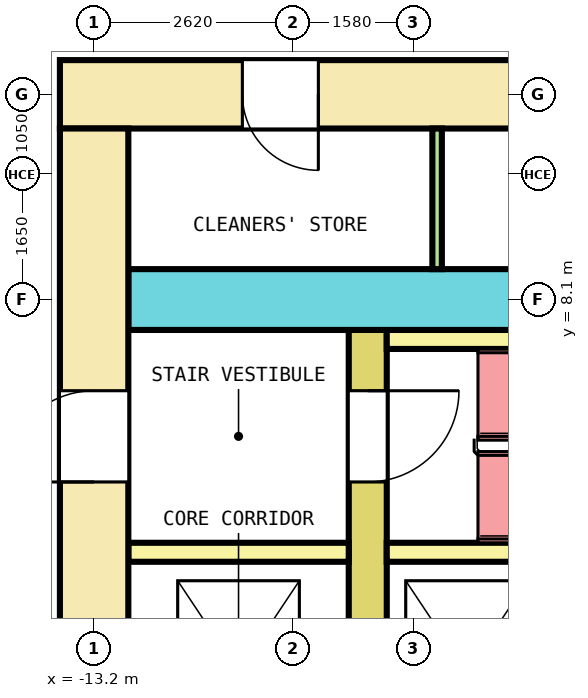
"""IFC4 building model, lengths in metres.
Left out: names, types, materials, properties, quantities, classifications, styles, units other than length and angle.
Written with IfcOpenShell. Run it as: python <this file> out.ifc"""

import sys

from ifc_helpers import new_model, si_unit, direction, frame, frame_2d, origin, place, context, subcontext, project, spatial, rectangle, extrude, element, fill, save


model = new_model("IFC4")
c1 = context("Model", 3, precision=1e-05, world=origin(), true_north=direction((0.0, 1.0)))
c2 = subcontext(c1, "Body", "Model", "MODEL_VIEW")
j1 = project(units=[si_unit("LENGTHUNIT", "METRE"), si_unit("PLANEANGLEUNIT", "RADIAN")], contexts=[c1])
p1 = place(None, origin())
s1 = spatial("IfcSite", under=j1, at=p1, CompositionType="ELEMENT")
p2 = place(p1, origin())
s2 = spatial("IfcBuilding", under=s1, at=p2, CompositionType="ELEMENT")
p3 = place(p2, frame((0.0, 0.0, 27.8)))
s3 = spatial("IfcBuildingStorey", under=s2, at=p3, CompositionType="ELEMENT", Elevation=27.8)
p4 = place(p3, frame((-13.65, 10.8, 0.0), z_axis=(0.0, 0.0, 1.0), x_axis=(1.0, 0.0, 0.0)))
e1 = element("IfcWall", 1, at=p4, inside=s3, PredefinedType="SHEAR", context=c2, shape_type="SweptSolid", body=[
    extrude(rectangle(XDim=27.3, YDim=0.9, at=frame_2d((13.65, 0.0))), origin(), (0.0, 0.0, 1.0), 4.1),
])
p5 = place(p4, frame((2.4, 0.0, 0.0)))
e2 = element("IfcOpeningElement", 2, at=p5, cuts=e1, PredefinedType="OPENING", context=c2, shape_type="SweptSolid", body=[
    extrude(rectangle(XDim=1.0, YDim=2.1, at=frame_2d((0.5, 1.05))), frame((0.0, 0.46, 0.0), z_axis=(0.0, -1.0, 0.0), x_axis=(1.0, 0.0, 0.0)), (0.0, 0.0, 1.0), 0.92),
])
p6 = place(p4, frame((6.494, 0.0, 0.0)))
e3 = element("IfcOpeningElement", 3, at=p6, cuts=e1, PredefinedType="OPENING", context=c2, shape_type="SweptSolid", body=[
    extrude(rectangle(XDim=1.0, YDim=2.1, at=frame_2d((0.5, 1.05))), frame((0.0, 0.46, 0.0), z_axis=(0.0, -1.0, 0.0), x_axis=(1.0, 0.0, 0.0)), (0.0, 0.0, 1.0), 0.92),
])
p7 = place(p4, frame((10.556, 0.0, 0.0)))
e4 = element("IfcOpeningElement", 4, at=p7, cuts=e1, PredefinedType="OPENING", context=c2, shape_type="SweptSolid", body=[
    extrude(rectangle(XDim=1.0, YDim=2.1, at=frame_2d((0.5, 1.05))), frame((0.0, 0.46, 0.0), z_axis=(0.0, -1.0, 0.0), x_axis=(1.0, 0.0, 0.0)), (0.0, 0.0, 1.0), 0.92),
])
p8 = place(p4, frame((18.859, 0.0, 0.0)))
e5 = element("IfcOpeningElement", 5, at=p8, cuts=e1, PredefinedType="OPENING", context=c2, shape_type="SweptSolid", body=[
    extrude(rectangle(XDim=1.0, YDim=2.1, at=frame_2d((0.5, 1.05))), frame((0.0, 0.46, 0.0), z_axis=(0.0, -1.0, 0.0), x_axis=(1.0, 0.0, 0.0)), (0.0, 0.0, 1.0), 0.92),
])
p9 = place(p4, frame((23.584, 0.0, 0.0)))
e6 = element("IfcOpeningElement", 6, at=p9, cuts=e1, PredefinedType="OPENING", context=c2, shape_type="SweptSolid", body=[
    extrude(rectangle(XDim=1.0, YDim=2.1, at=frame_2d((0.5, 1.05))), frame((0.0, 0.46, 0.0), z_axis=(0.0, -1.0, 0.0), x_axis=(1.0, 0.0, 0.0)), (0.0, 0.0, 1.0), 0.92),
])
p10 = place(p4, frame((14.575, 0.0, 0.0)))
e7 = element("IfcOpeningElement", 7, at=p10, cuts=e1, PredefinedType="OPENING", context=c2, shape_type="SweptSolid", body=[
    extrude(rectangle(XDim=1.4, YDim=2.1, at=frame_2d((0.7, 1.05))), frame((0.0, 0.46, 0.0), z_axis=(0.0, -1.0, 0.0), x_axis=(1.0, 0.0, 0.0)), (0.0, 0.0, 1.0), 0.92),
])
p11 = place(p3, frame((-13.2, -10.35, 0.0), z_axis=(0.0, 0.0, 1.0), x_axis=(0.0, 1.0, 0.0)))
e8 = element("IfcWall", 8, at=p11, inside=s3, PredefinedType="SHEAR", context=c2, shape_type="SweptSolid", body=[
    extrude(rectangle(XDim=20.7, YDim=0.9, at=frame_2d((10.35, 0.0))), origin(), (0.0, 0.0, 1.0), 4.1),
])
p12 = place(p11, frame((9.15, 0.0, 0.0)))
e9 = element("IfcOpeningElement", 9, at=p12, cuts=e8, PredefinedType="OPENING", context=c2, shape_type="SweptSolid", body=[
    extrude(rectangle(XDim=2.4, YDim=2.1, at=frame_2d((1.2, 1.05))), frame((0.0, 0.46, 0.0), z_axis=(0.0, -1.0, 0.0), x_axis=(1.0, 0.0, 0.0)), (0.0, 0.0, 1.0), 0.92),
])
p13 = place(p11, frame((16.05, 0.0, 0.0)))
e10 = element("IfcOpeningElement", 10, at=p13, cuts=e8, PredefinedType="OPENING", context=c2, shape_type="SweptSolid", body=[
    extrude(rectangle(XDim=1.2, YDim=2.1, at=frame_2d((0.6, 1.05))), frame((0.0, 0.46, 0.0), z_axis=(0.0, -1.0, 0.0), x_axis=(1.0, 0.0, 0.0)), (0.0, 0.0, 1.0), 0.92),
])
p14 = place(p11, frame((3.45, 0.0, 0.0)))
e11 = element("IfcOpeningElement", 11, at=p14, cuts=e8, PredefinedType="OPENING", context=c2, shape_type="SweptSolid", body=[
    extrude(rectangle(XDim=1.2, YDim=2.1, at=frame_2d((0.6, 1.05))), frame((0.0, 0.46, 0.0), z_axis=(0.0, -1.0, 0.0), x_axis=(1.0, 0.0, 0.0)), (0.0, 0.0, 1.0), 0.92),
])
p15 = place(p3, frame((-12.75, 8.1, 0.0), z_axis=(0.0, 0.0, 1.0), x_axis=(1.0, 0.0, 0.0)))
e12 = element("IfcWall", 12, at=p15, inside=s3, PredefinedType="SHEAR", context=c2, shape_type="SweptSolid", body=[
    extrude(rectangle(XDim=25.5, YDim=0.8, at=frame_2d((12.75, 0.0))), origin(), (0.0, 0.0, 1.0), 4.1),
])
p16 = place(p15, frame((13.675, 0.0, 0.0)))
e13 = element("IfcOpeningElement", 13, at=p16, cuts=e12, PredefinedType="OPENING", context=c2, shape_type="SweptSolid", body=[
    extrude(rectangle(XDim=1.4, YDim=2.1, at=frame_2d((0.7, 1.05))), frame((0.0, 0.41, 0.0), z_axis=(0.0, -1.0, 0.0), x_axis=(1.0, 0.0, 0.0)), (0.0, 0.0, 1.0), 0.82),
])
p17 = place(p3, frame((-9.6, -7.7, 0.0), z_axis=(0.0, 0.0, 1.0), x_axis=(0.0, 1.0, 0.0)))
e14 = element("IfcWall", 14, at=p17, inside=s3, PredefinedType="SHEAR", context=c2, shape_type="SweptSolid", body=[
    extrude(rectangle(XDim=15.4, YDim=0.5, at=frame_2d((7.7, 0.0))), origin(), (0.0, 0.0, 1.0), 4.1),
])
p18 = place(p17, frame((6.5, 0.0, 0.0)))
e15 = element("IfcOpeningElement", 15, at=p18, cuts=e14, PredefinedType="OPENING", context=c2, shape_type="SweptSolid", body=[
    extrude(rectangle(XDim=2.4, YDim=2.1, at=frame_2d((1.2, 1.05))), frame((0.0, 0.26, 0.0), z_axis=(0.0, -1.0, 0.0), x_axis=(1.0, 0.0, 0.0)), (0.0, 0.0, 1.0), 0.52),
])
p19 = place(p17, frame((13.4, 0.0, 0.0)))
e16 = element("IfcOpeningElement", 16, at=p19, cuts=e14, PredefinedType="OPENING", context=c2, shape_type="SweptSolid", body=[
    extrude(rectangle(XDim=1.2, YDim=2.1, at=frame_2d((0.6, 1.05))), frame((0.0, 0.26, 0.0), z_axis=(0.0, -1.0, 0.0), x_axis=(1.0, 0.0, 0.0)), (0.0, 0.0, 1.0), 0.52),
])
p20 = place(p17, frame((0.8, 0.0, 0.0)))
e17 = element("IfcOpeningElement", 17, at=p20, cuts=e14, PredefinedType="OPENING", context=c2, shape_type="SweptSolid", body=[
    extrude(rectangle(XDim=1.2, YDim=2.1, at=frame_2d((0.6, 1.05))), frame((0.0, 0.26, 0.0), z_axis=(0.0, -1.0, 0.0), x_axis=(1.0, 0.0, 0.0)), (0.0, 0.0, 1.0), 0.52),
])
p21 = place(p3, frame((-12.75, 4.775, 0.0), z_axis=(0.0, 0.0, 1.0), x_axis=(1.0, 0.0, 0.0)))
e18 = element("IfcWall", 18, at=p21, inside=s3, PredefinedType="SOLIDWALL", context=c2, shape_type="SweptSolid", body=[
    extrude(rectangle(XDim=2.9, YDim=0.25, at=frame_2d((1.45, 0.0))), origin(), (0.0, 0.0, 1.0), 4.1),
])
p22 = place(p3, frame((-9.35, 4.775, 0.0), z_axis=(0.0, 0.0, 1.0), x_axis=(1.0, 0.0, 0.0)))
e19 = element("IfcWall", 19, at=p22, inside=s3, PredefinedType="SOLIDWALL", context=c2, shape_type="SweptSolid", body=[
    extrude(rectangle(XDim=18.7, YDim=0.25, at=frame_2d((9.35, 0.0))), origin(), (0.0, 0.0, 1.0), 4.1),
])
p23 = place(p3, frame((-9.35, 7.575, 0.0), z_axis=(0.0, 0.0, 1.0), x_axis=(1.0, 0.0, 0.0)))
e20 = element("IfcWall", 20, at=p23, inside=s3, PredefinedType="SOLIDWALL", context=c2, shape_type="SweptSolid", body=[
    extrude(rectangle(XDim=5.8, YDim=0.25, at=frame_2d((2.9, 0.0))), origin(), (0.0, 0.0, 1.0), 4.1),
])
p24 = place(p3, frame((-8.688, 8.5, 0.0), z_axis=(0.0, 0.0, 1.0), x_axis=(0.0, 1.0, 0.0)))
e21 = element("IfcWall", 21, at=p24, inside=s3, PredefinedType="PARTITIONING", context=c2, shape_type="SweptSolid", body=[
    extrude(rectangle(XDim=1.85, YDim=0.125, at=frame_2d((0.925, 0.0))), origin(), (0.0, 0.0, 1.0), 4.1),
])
p25 = place(p19, origin())
e22 = element("IfcDoor", 22, at=p25, inside=s3, OperationType="SINGLE_SWING_RIGHT", PredefinedType="DOOR", context=c2, shape_type="SweptSolid", body=[
    extrude(rectangle(XDim=1.2, YDim=2.1, at=frame_2d((0.6, 1.05))), frame((0.0, 0.2, 0.0), z_axis=(0.0, -1.0, 0.0), x_axis=(1.0, 0.0, 0.0)), (0.0, 0.0, 1.0), 0.4),
])
fill(e16, e22)
p26 = place(p13, origin())
e23 = element("IfcDoor", 23, at=p26, inside=s3, OperationType="SINGLE_SWING_LEFT", PredefinedType="DOOR", context=c2, shape_type="SweptSolid", body=[
    extrude(rectangle(XDim=1.2, YDim=2.1, at=frame_2d((0.6, 1.05))), frame((0.0, 0.3, 0.0), z_axis=(0.0, -1.0, 0.0), x_axis=(1.0, 0.0, 0.0)), (0.0, 0.0, 1.0), 0.6),
])
fill(e10, e23)
p27 = place(p5, origin())
e24 = element("IfcDoor", 24, at=p27, inside=s3, OperationType="SINGLE_SWING_LEFT", PredefinedType="DOOR", context=c2, shape_type="SweptSolid", body=[
    extrude(rectangle(XDim=1.0, YDim=2.1, at=frame_2d((0.5, 1.05))), frame((0.0, 0.3, 0.0), z_axis=(0.0, -1.0, 0.0), x_axis=(1.0, 0.0, 0.0)), (0.0, 0.0, 1.0), 0.6),
])
fill(e2, e24)
save(model, sys.argv[1])
